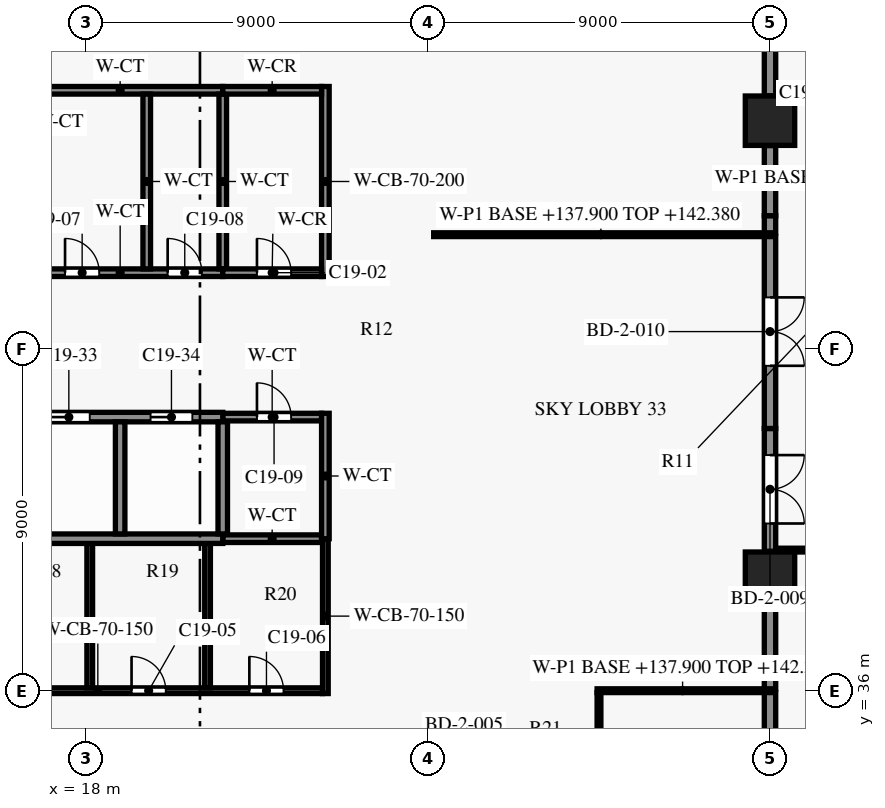
"""IFC4 building model, lengths in metres.
Left out: names, types, materials, properties, quantities, classifications, styles, units other than length and angle.
Written with IfcOpenShell. Run it as: python <this file> out.ifc"""

import sys

from ifc_helpers import new_model, si_unit, direction, frame, frame_2d, origin, origin_2d, place, context, subcontext, project, spatial, rectangle, extrude, element, fill, save


model = new_model("IFC4")
c1 = context("Model", 3, precision=1e-05, world=origin(), true_north=direction((0.0, 1.0)))
c2 = subcontext(c1, "Body", "Model", "MODEL_VIEW")
j1 = project(units=[si_unit("LENGTHUNIT", "METRE"), si_unit("PLANEANGLEUNIT", "RADIAN")], contexts=[c1])
p1 = place(None, origin())
s1 = spatial("IfcSite", under=j1, at=p1, CompositionType="ELEMENT")
p2 = place(p1, origin())
s2 = spatial("IfcBuilding", under=s1, at=p2, CompositionType="ELEMENT")
p3 = place(p2, frame((0.0, 0.0, 137.9)))
s3 = spatial("IfcBuildingStorey", under=s2, at=p3, CompositionType="ELEMENT", Elevation=137.9)
for number, where, z_axis, x_axis in (
    (1, (36.0, 39.0, 0.0), (0.0, 0.0, 1.0), (1.0, 0.0, 0.0)),
    (2, (36.0, 51.0, 0.0), (0.0, 0.0, 1.0), (1.0, 0.0, 0.0)),
):
    element("IfcColumn", number, at=place(p3, frame(where, z_axis=z_axis, x_axis=x_axis)), inside=s3, PredefinedType="COLUMN", context=c2, shape_type="SweptSolid", body=[
        extrude(rectangle(XDim=1.3, YDim=1.3, at=origin_2d()), origin(), (0.0, 0.0, 1.0), 5.5),
    ])
p4 = place(p3, frame((12.4, 36.0, 0.0), z_axis=(0.0, 0.0, 1.0), x_axis=(1.0, 0.0, 0.0)))
e3 = element("IfcWall", 3, at=p4, inside=s3, PredefinedType="SHEAR", context=c2, shape_type="SweptSolid", body=[
    extrude(rectangle(XDim=11.825, YDim=0.15, at=frame_2d((5.913, 0.0))), origin(), (0.0, 0.0, 1.0), 5.2),
])
p5 = place(p4, frame((0.825, 0.0, 0.0)))
e4 = element("IfcOpeningElement", 4, at=p5, cuts=e3, PredefinedType="OPENING", context=c2, shape_type="SweptSolid", body=[
    extrude(rectangle(XDim=0.95, YDim=2.1, at=frame_2d((0.475, 1.05))), frame((0.0, 0.085, 0.0), z_axis=(0.0, -1.0, 0.0), x_axis=(1.0, 0.0, 0.0)), (0.0, 0.0, 1.0), 0.17),
])
p6 = place(p4, frame((3.65, 0.0, 0.0)))
e5 = element("IfcOpeningElement", 5, at=p6, cuts=e3, PredefinedType="OPENING", context=c2, shape_type="SweptSolid", body=[
    extrude(rectangle(XDim=1.0, YDim=2.1, at=frame_2d((0.5, 1.05))), frame((0.0, 0.085, 0.0), z_axis=(0.0, -1.0, 0.0), x_axis=(1.0, 0.0, 0.0)), (0.0, 0.0, 1.0), 0.17),
])
p7 = place(p4, frame((6.8, 0.0, 0.0)))
e6 = element("IfcOpeningElement", 6, at=p7, cuts=e3, PredefinedType="OPENING", context=c2, shape_type="SweptSolid", body=[
    extrude(rectangle(XDim=0.9, YDim=2.1, at=frame_2d((0.45, 1.05))), frame((0.0, 0.085, 0.0), z_axis=(0.0, -1.0, 0.0), x_axis=(1.0, 0.0, 0.0)), (0.0, 0.0, 1.0), 0.17),
])
p8 = place(p4, frame((9.9, 0.0, 0.0)))
e7 = element("IfcOpeningElement", 7, at=p8, cuts=e3, PredefinedType="OPENING", context=c2, shape_type="SweptSolid", body=[
    extrude(rectangle(XDim=0.9, YDim=2.1, at=frame_2d((0.45, 1.05))), frame((0.0, 0.085, 0.0), z_axis=(0.0, -1.0, 0.0), x_axis=(1.0, 0.0, 0.0)), (0.0, 0.0, 1.0), 0.17),
])
p9 = place(p3, frame((21.6, 40.0, 0.0), z_axis=(0.0, 0.0, 1.0), x_axis=(1.0, 0.0, 0.0)))
e8 = element("IfcWall", 8, at=p9, inside=s3, PredefinedType="PARTITIONING", context=c2, shape_type="SweptSolid", body=[
    extrude(rectangle(XDim=2.6, YDim=0.2, at=frame_2d((1.3, 0.0))), origin(), (0.0, 0.0, 1.0), 5.2),
])
p10 = place(p3, frame((0.125, 40.0, 0.0), z_axis=(0.0, 0.0, 1.0), x_axis=(1.0, 0.0, 0.0)))
e9 = element("IfcWall", 9, at=p10, inside=s3, PredefinedType="SHEAR", context=c2, shape_type="SweptSolid", body=[
    extrude(rectangle(XDim=21.475, YDim=0.25, at=frame_2d((10.738, 0.0))), origin(), (0.0, 0.0, 1.0), 5.2),
])
p11 = place(p3, frame((21.6, 43.2, 0.0), z_axis=(0.0, 0.0, 1.0), x_axis=(1.0, 0.0, 0.0)))
e10 = element("IfcWall", 10, at=p11, inside=s3, PredefinedType="PARTITIONING", context=c2, shape_type="SweptSolid", body=[
    extrude(rectangle(XDim=2.6, YDim=0.2, at=frame_2d((1.3, 0.0))), origin(), (0.0, 0.0, 1.0), 5.2),
])
p12 = place(p11, frame((0.9, 0.0, 0.0)))
e11 = element("IfcOpeningElement", 11, at=p12, cuts=e10, PredefinedType="OPENING", context=c2, shape_type="SweptSolid", body=[
    extrude(rectangle(XDim=0.9, YDim=2.1, at=frame_2d((0.45, 1.05))), frame((0.0, 0.11, 0.0), z_axis=(0.0, -1.0, 0.0), x_axis=(1.0, 0.0, 0.0)), (0.0, 0.0, 1.0), 0.22),
])
p13 = place(p3, frame((0.125, 43.2, 0.0), z_axis=(0.0, 0.0, 1.0), x_axis=(1.0, 0.0, 0.0)))
e12 = element("IfcWall", 12, at=p13, inside=s3, PredefinedType="SHEAR", context=c2, shape_type="SweptSolid", body=[
    extrude(rectangle(XDim=21.475, YDim=0.25, at=frame_2d((10.738, 0.0))), origin(), (0.0, 0.0, 1.0), 5.2),
])
p14 = place(p13, frame((0.675, 0.0, 0.0)))
e13 = element("IfcOpeningElement", 13, at=p14, cuts=e12, PredefinedType="OPENING", context=c2, shape_type="SweptSolid", body=[
    extrude(rectangle(XDim=1.1, YDim=2.1, at=frame_2d((0.55, 1.05))), frame((0.0, 0.135, 0.0), z_axis=(0.0, -1.0, 0.0), x_axis=(1.0, 0.0, 0.0)), (0.0, 0.0, 1.0), 0.27),
])
p15 = place(p13, frame((3.375, 0.0, 0.0)))
e14 = element("IfcOpeningElement", 14, at=p15, cuts=e12, PredefinedType="OPENING", context=c2, shape_type="SweptSolid", body=[
    extrude(rectangle(XDim=1.1, YDim=2.1, at=frame_2d((0.55, 1.05))), frame((0.0, 0.135, 0.0), z_axis=(0.0, -1.0, 0.0), x_axis=(1.0, 0.0, 0.0)), (0.0, 0.0, 1.0), 0.27),
])
p16 = place(p13, frame((6.075, 0.0, 0.0)))
e15 = element("IfcOpeningElement", 15, at=p16, cuts=e12, PredefinedType="OPENING", context=c2, shape_type="SweptSolid", body=[
    extrude(rectangle(XDim=1.1, YDim=2.1, at=frame_2d((0.55, 1.05))), frame((0.0, 0.135, 0.0), z_axis=(0.0, -1.0, 0.0), x_axis=(1.0, 0.0, 0.0)), (0.0, 0.0, 1.0), 0.27),
])
p17 = place(p13, frame((8.775, 0.0, 0.0)))
e16 = element("IfcOpeningElement", 16, at=p17, cuts=e12, PredefinedType="OPENING", context=c2, shape_type="SweptSolid", body=[
    extrude(rectangle(XDim=1.1, YDim=2.1, at=frame_2d((0.55, 1.05))), frame((0.0, 0.135, 0.0), z_axis=(0.0, -1.0, 0.0), x_axis=(1.0, 0.0, 0.0)), (0.0, 0.0, 1.0), 0.27),
])
p18 = place(p13, frame((11.475, 0.0, 0.0)))
e17 = element("IfcOpeningElement", 17, at=p18, cuts=e12, PredefinedType="OPENING", context=c2, shape_type="SweptSolid", body=[
    extrude(rectangle(XDim=1.1, YDim=2.1, at=frame_2d((0.55, 1.05))), frame((0.0, 0.135, 0.0), z_axis=(0.0, -1.0, 0.0), x_axis=(1.0, 0.0, 0.0)), (0.0, 0.0, 1.0), 0.27),
])
p19 = place(p13, frame((14.175, 0.0, 0.0)))
e18 = element("IfcOpeningElement", 18, at=p19, cuts=e12, PredefinedType="OPENING", context=c2, shape_type="SweptSolid", body=[
    extrude(rectangle(XDim=1.1, YDim=2.1, at=frame_2d((0.55, 1.05))), frame((0.0, 0.135, 0.0), z_axis=(0.0, -1.0, 0.0), x_axis=(1.0, 0.0, 0.0)), (0.0, 0.0, 1.0), 0.27),
])
p20 = place(p13, frame((16.875, 0.0, 0.0)))
e19 = element("IfcOpeningElement", 19, at=p20, cuts=e12, PredefinedType="OPENING", context=c2, shape_type="SweptSolid", body=[
    extrude(rectangle(XDim=1.1, YDim=2.1, at=frame_2d((0.55, 1.05))), frame((0.0, 0.135, 0.0), z_axis=(0.0, -1.0, 0.0), x_axis=(1.0, 0.0, 0.0)), (0.0, 0.0, 1.0), 0.27),
])
p21 = place(p13, frame((19.575, 0.0, 0.0)))
e20 = element("IfcOpeningElement", 20, at=p21, cuts=e12, PredefinedType="OPENING", context=c2, shape_type="SweptSolid", body=[
    extrude(rectangle(XDim=1.1, YDim=2.1, at=frame_2d((0.55, 1.05))), frame((0.0, 0.135, 0.0), z_axis=(0.0, -1.0, 0.0), x_axis=(1.0, 0.0, 0.0)), (0.0, 0.0, 1.0), 0.27),
])
p22 = place(p3, frame((16.2, 47.0, 0.0), z_axis=(0.0, 0.0, 1.0), x_axis=(1.0, 0.0, 0.0)))
e21 = element("IfcWall", 21, at=p22, inside=s3, PredefinedType="PARTITIONING", context=c2, shape_type="SweptSolid", body=[
    extrude(rectangle(XDim=5.4, YDim=0.2, at=frame_2d((2.7, 0.0))), origin(), (0.0, 0.0, 1.0), 5.2),
])
p23 = place(p22, frame((1.25, 0.0, 0.0)))
e22 = element("IfcOpeningElement", 22, at=p23, cuts=e21, PredefinedType="OPENING", context=c2, shape_type="SweptSolid", body=[
    extrude(rectangle(XDim=0.9, YDim=2.1, at=frame_2d((0.45, 1.05))), frame((0.0, 0.11, 0.0), z_axis=(0.0, -1.0, 0.0), x_axis=(1.0, 0.0, 0.0)), (0.0, 0.0, 1.0), 0.22),
])
p24 = place(p22, frame((3.95, 0.0, 0.0)))
e23 = element("IfcOpeningElement", 23, at=p24, cuts=e21, PredefinedType="OPENING", context=c2, shape_type="SweptSolid", body=[
    extrude(rectangle(XDim=0.9, YDim=2.1, at=frame_2d((0.45, 1.05))), frame((0.0, 0.11, 0.0), z_axis=(0.0, -1.0, 0.0), x_axis=(1.0, 0.0, 0.0)), (0.0, 0.0, 1.0), 0.22),
])
p25 = place(p3, frame((21.6, 47.0, 0.0), z_axis=(0.0, 0.0, 1.0), x_axis=(1.0, 0.0, 0.0)))
e24 = element("IfcWall", 24, at=p25, inside=s3, PredefinedType="PARTITIONING", context=c2, shape_type="SweptSolid", body=[
    extrude(rectangle(XDim=2.6, YDim=0.2, at=frame_2d((1.3, 0.0))), origin(), (0.0, 0.0, 1.0), 5.2),
])
p26 = place(p25, frame((0.9, 0.0, 0.0)))
e25 = element("IfcOpeningElement", 25, at=p26, cuts=e24, PredefinedType="OPENING", context=c2, shape_type="SweptSolid", body=[
    extrude(rectangle(XDim=0.9, YDim=2.1, at=frame_2d((0.45, 1.05))), frame((0.0, 0.11, 0.0), z_axis=(0.0, -1.0, 0.0), x_axis=(1.0, 0.0, 0.0)), (0.0, 0.0, 1.0), 0.22),
])
p27 = place(p3, frame((16.2, 51.8, 0.0), z_axis=(0.0, 0.0, 1.0), x_axis=(1.0, 0.0, 0.0)))
e26 = element("IfcWall", 26, at=p27, inside=s3, PredefinedType="PARTITIONING", context=c2, shape_type="SweptSolid", body=[
    extrude(rectangle(XDim=5.4, YDim=0.2, at=frame_2d((2.7, 0.0))), origin(), (0.0, 0.0, 1.0), 5.2),
])
p28 = place(p3, frame((21.6, 51.8, 0.0), z_axis=(0.0, 0.0, 1.0), x_axis=(1.0, 0.0, 0.0)))
e27 = element("IfcWall", 27, at=p28, inside=s3, PredefinedType="PARTITIONING", context=c2, shape_type="SweptSolid", body=[
    extrude(rectangle(XDim=2.6, YDim=0.2, at=frame_2d((1.3, 0.0))), origin(), (0.0, 0.0, 1.0), 5.2),
])
p29 = place(p3, frame((18.1, 36.075, 0.0), z_axis=(0.0, 0.0, 1.0), x_axis=(0.0, 1.0, 0.0)))
e28 = element("IfcWall", 28, at=p29, inside=s3, PredefinedType="PARTITIONING", context=c2, shape_type="SweptSolid", body=[
    extrude(rectangle(XDim=3.8, YDim=0.15, at=frame_2d((1.9, 0.0))), origin(), (0.0, 0.0, 1.0), 5.2),
])
p30 = place(p3, frame((18.9, 40.125, 0.0), z_axis=(0.0, 0.0, 1.0), x_axis=(0.0, 1.0, 0.0)))
e29 = element("IfcWall", 29, at=p30, inside=s3, PredefinedType="SHEAR", context=c2, shape_type="SweptSolid", body=[
    extrude(rectangle(XDim=2.95, YDim=0.25, at=frame_2d((1.475, 0.0))), origin(), (0.0, 0.0, 1.0), 5.2),
])
p31 = place(p3, frame((19.6, 47.1, 0.0), z_axis=(0.0, 0.0, 1.0), x_axis=(0.0, 1.0, 0.0)))
e30 = element("IfcWall", 30, at=p31, inside=s3, PredefinedType="PARTITIONING", context=c2, shape_type="SweptSolid", body=[
    extrude(rectangle(XDim=4.6, YDim=0.2, at=frame_2d((2.3, 0.0))), origin(), (0.0, 0.0, 1.0), 5.2),
])
p32 = place(p3, frame((21.2, 36.075, 0.0), z_axis=(0.0, 0.0, 1.0), x_axis=(0.0, 1.0, 0.0)))
e31 = element("IfcWall", 31, at=p32, inside=s3, PredefinedType="PARTITIONING", context=c2, shape_type="SweptSolid", body=[
    extrude(rectangle(XDim=3.8, YDim=0.15, at=frame_2d((1.9, 0.0))), origin(), (0.0, 0.0, 1.0), 5.2),
])
p33 = place(p3, frame((21.6, 47.1, 0.0), z_axis=(0.0, 0.0, 1.0), x_axis=(0.0, 1.0, 0.0)))
e32 = element("IfcWall", 32, at=p33, inside=s3, PredefinedType="PARTITIONING", context=c2, shape_type="SweptSolid", body=[
    extrude(rectangle(XDim=4.6, YDim=0.2, at=frame_2d((2.3, 0.0))), origin(), (0.0, 0.0, 1.0), 5.2),
])
p34 = place(p3, frame((21.6, 40.125, 0.0), z_axis=(0.0, 0.0, 1.0), x_axis=(0.0, 1.0, 0.0)))
e33 = element("IfcWall", 33, at=p34, inside=s3, PredefinedType="SHEAR", context=c2, shape_type="SweptSolid", body=[
    extrude(rectangle(XDim=2.95, YDim=0.25, at=frame_2d((1.475, 0.0))), origin(), (0.0, 0.0, 1.0), 5.2),
])
p35 = place(p3, frame((24.3, 35.925, 0.0), z_axis=(0.0, 0.0, 1.0), x_axis=(0.0, 1.0, 0.0)))
e34 = element("IfcWall", 34, at=p35, inside=s3, PredefinedType="SHEAR", context=c2, shape_type="SweptSolid", body=[
    extrude(rectangle(XDim=4.075, YDim=0.15, at=frame_2d((2.038, 0.0))), origin(), (0.0, 0.0, 1.0), 5.2),
])
p36 = place(p3, frame((24.3, 40.0, 0.0), z_axis=(0.0, 0.0, 1.0), x_axis=(0.0, 1.0, 0.0)))
e35 = element("IfcWall", 35, at=p36, inside=s3, PredefinedType="PARTITIONING", context=c2, shape_type="SweptSolid", body=[
    extrude(rectangle(XDim=3.3, YDim=0.2, at=frame_2d((1.65, 0.0))), origin(), (0.0, 0.0, 1.0), 5.2),
])
p37 = place(p3, frame((24.3, 46.9, 0.0), z_axis=(0.0, 0.0, 1.0), x_axis=(0.0, 1.0, 0.0)))
e36 = element("IfcWall", 36, at=p37, inside=s3, PredefinedType="SHEAR", context=c2, shape_type="SweptSolid", body=[
    extrude(rectangle(XDim=5.0, YDim=0.2, at=frame_2d((2.5, 0.0))), origin(), (0.0, 0.0, 1.0), 5.2),
])
p38 = place(p3, frame((31.5, 35.95, 0.0), z_axis=(0.0, 0.0, 1.0), x_axis=(0.0, -1.0, 0.0)))
e37 = element("IfcWall", 37, at=p38, inside=s3, PredefinedType="PARTITIONING", context=c2, shape_type="SweptSolid", body=[
    extrude(rectangle(XDim=2.4, YDim=0.1, at=frame_2d((1.2, 0.0))), origin(), (0.0, 0.0, 1.0), 5.18),
])
p39 = place(p3, frame((36.0, 35.95, 0.0), z_axis=(0.0, 0.0, 1.0), x_axis=(0.0, -1.0, 0.0)))
e38 = element("IfcWall", 38, at=p39, inside=s3, PredefinedType="PARTITIONING", context=c2, shape_type="SweptSolid", body=[
    extrude(rectangle(XDim=5.9, YDim=0.3, at=frame_2d((2.95, 0.0))), origin(), (0.0, 0.0, 1.0), 4.48),
])
p40 = place(p3, frame((35.95, 36.0, 0.0), z_axis=(0.0, 0.0, 1.0), x_axis=(-1.0, 0.0, 0.0)))
e39 = element("IfcWall", 39, at=p40, inside=s3, PredefinedType="PARTITIONING", context=c2, shape_type="SweptSolid", body=[
    extrude(rectangle(XDim=4.5, YDim=0.1, at=frame_2d((2.25, 0.0))), origin(), (0.0, 0.0, 1.0), 4.48),
])
p41 = place(p3, frame((36.0, 38.345, 0.0), z_axis=(0.0, 0.0, 1.0), x_axis=(0.0, -1.0, 0.0)))
e40 = element("IfcWall", 40, at=p41, inside=s3, PredefinedType="PARTITIONING", context=c2, shape_type="SweptSolid", body=[
    extrude(rectangle(XDim=2.295, YDim=0.3, at=frame_2d((1.147, 0.0))), origin(), (0.0, 0.0, 1.0), 4.48),
])
p42 = place(p3, frame((66.05, 39.7, 0.0), z_axis=(0.0, 0.0, 1.0), x_axis=(-1.0, 0.0, 0.0)))
e41 = element("IfcWall", 41, at=p42, inside=s3, PredefinedType="PARTITIONING", context=c2, shape_type="SweptSolid", body=[
    extrude(rectangle(XDim=30.0, YDim=0.1, at=frame_2d((15.0, 0.0))), origin(), (0.0, 0.0, 1.0), 4.48),
])
p43 = place(p3, frame((36.0, 42.9, 0.0), z_axis=(0.0, 0.0, 1.0), x_axis=(0.0, -1.0, 0.0)))
e42 = element("IfcWall", 42, at=p43, inside=s3, PredefinedType="PARTITIONING", context=c2, shape_type="SweptSolid", body=[
    extrude(rectangle(XDim=3.23, YDim=0.3, at=frame_2d((1.615, 0.0))), origin(), (0.0, 0.0, 1.0), 4.48),
])
p44 = place(p43, frame((0.7, 0.0, 0.0)))
e43 = element("IfcOpeningElement", 43, at=p44, cuts=e42, PredefinedType="OPENING", context=c2, shape_type="SweptSolid", body=[
    extrude(rectangle(XDim=1.8, YDim=2.1, at=frame_2d((0.9, 1.05))), frame((0.0, 0.16, 0.0), z_axis=(0.0, -1.0, 0.0), x_axis=(1.0, 0.0, 0.0)), (0.0, 0.0, 1.0), 0.32),
])
p45 = place(p3, frame((36.0, 47.95, 0.0), z_axis=(0.0, 0.0, 1.0), x_axis=(0.0, -1.0, 0.0)))
e44 = element("IfcWall", 44, at=p45, inside=s3, PredefinedType="PARTITIONING", context=c2, shape_type="SweptSolid", body=[
    extrude(rectangle(XDim=5.05, YDim=0.3, at=frame_2d((2.525, 0.0))), origin(), (0.0, 0.0, 1.0), 4.48),
])
p46 = place(p45, frame((1.6, 0.0, 0.0)))
e45 = element("IfcOpeningElement", 45, at=p46, cuts=e44, PredefinedType="OPENING", context=c2, shape_type="SweptSolid", body=[
    extrude(rectangle(XDim=1.8, YDim=2.1, at=frame_2d((0.9, 1.05))), frame((0.0, 0.16, 0.0), z_axis=(0.0, -1.0, 0.0), x_axis=(1.0, 0.0, 0.0)), (0.0, 0.0, 1.0), 0.32),
])
p47 = place(p3, frame((27.15, 48.0, 0.0), z_axis=(0.0, 0.0, 1.0), x_axis=(1.0, 0.0, 0.0)))
e46 = element("IfcWall", 46, at=p47, inside=s3, PredefinedType="PARTITIONING", context=c2, shape_type="SweptSolid", body=[
    extrude(rectangle(XDim=8.8, YDim=0.1, at=frame_2d((4.4, 0.0))), origin(), (0.0, 0.0, 1.0), 4.48),
])
p48 = place(p3, frame((36.0, 48.05, 0.0), z_axis=(0.0, 0.0, 1.0), x_axis=(0.0, 1.0, 0.0)))
e47 = element("IfcWall", 47, at=p48, inside=s3, PredefinedType="PARTITIONING", context=c2, shape_type="SweptSolid", body=[
    extrude(rectangle(XDim=0.45, YDim=0.3, at=frame_2d((0.225, 0.0))), origin(), (0.0, 0.0, 1.0), 4.48),
])
p49 = place(p3, frame((36.0, 48.5, 0.0), z_axis=(0.0, 0.0, 1.0), x_axis=(0.0, 1.0, 0.0)))
e48 = element("IfcWall", 48, at=p49, inside=s3, PredefinedType="PARTITIONING", context=c2, shape_type="SweptSolid", body=[
    extrude(rectangle(XDim=1.845, YDim=0.3, at=frame_2d((0.922, 0.0))), origin(), (0.0, 0.0, 1.0), 4.48),
])
p50 = place(p3, frame((36.0, 51.655, 0.0), z_axis=(0.0, 0.0, 1.0), x_axis=(0.0, 1.0, 0.0)))
e49 = element("IfcWall", 49, at=p50, inside=s3, PredefinedType="PARTITIONING", context=c2, shape_type="SweptSolid", body=[
    extrude(rectangle(XDim=2.045, YDim=0.3, at=frame_2d((1.022, 0.0))), origin(), (0.0, 0.0, 1.0), 4.48),
])
p51 = place(p26, origin())
e50 = element("IfcDoor", 50, at=p51, inside=s3, OperationType="SINGLE_SWING_LEFT", PredefinedType="DOOR", context=c2, shape_type="SweptSolid", body=[
    extrude(rectangle(XDim=0.9, YDim=2.1, at=frame_2d((0.45, 1.05))), frame((0.0, 0.025, 0.0), z_axis=(0.0, -1.0, 0.0), x_axis=(1.0, 0.0, 0.0)), (0.0, 0.0, 1.0), 0.05),
])
fill(e25, e50)
p52 = place(p7, origin())
e51 = element("IfcDoor", 51, at=p52, inside=s3, OperationType="SINGLE_SWING_RIGHT", PredefinedType="DOOR", context=c2, shape_type="SweptSolid", body=[
    extrude(rectangle(XDim=0.9, YDim=2.1, at=frame_2d((0.45, 1.05))), frame((0.0, 0.025, 0.0), z_axis=(0.0, -1.0, 0.0), x_axis=(1.0, 0.0, 0.0)), (0.0, 0.0, 1.0), 0.05),
])
fill(e6, e51)
p53 = place(p8, origin())
e52 = element("IfcDoor", 52, at=p53, inside=s3, OperationType="SINGLE_SWING_LEFT", PredefinedType="DOOR", context=c2, shape_type="SweptSolid", body=[
    extrude(rectangle(XDim=0.9, YDim=2.1, at=frame_2d((0.45, 1.05))), frame((0.0, 0.025, 0.0), z_axis=(0.0, -1.0, 0.0), x_axis=(1.0, 0.0, 0.0)), (0.0, 0.0, 1.0), 0.05),
])
fill(e7, e52)
p54 = place(p23, origin())
e53 = element("IfcDoor", 53, at=p54, inside=s3, OperationType="SINGLE_SWING_LEFT", PredefinedType="DOOR", context=c2, shape_type="SweptSolid", body=[
    extrude(rectangle(XDim=0.9, YDim=2.1, at=frame_2d((0.45, 1.05))), frame((0.0, 0.025, 0.0), z_axis=(0.0, -1.0, 0.0), x_axis=(1.0, 0.0, 0.0)), (0.0, 0.0, 1.0), 0.05),
])
fill(e22, e53)
p55 = place(p24, origin())
e54 = element("IfcDoor", 54, at=p55, inside=s3, OperationType="SINGLE_SWING_RIGHT", PredefinedType="DOOR", context=c2, shape_type="SweptSolid", body=[
    extrude(rectangle(XDim=0.9, YDim=2.1, at=frame_2d((0.45, 1.05))), frame((0.0, 0.025, 0.0), z_axis=(0.0, -1.0, 0.0), x_axis=(1.0, 0.0, 0.0)), (0.0, 0.0, 1.0), 0.05),
])
fill(e23, e54)
p56 = place(p12, origin())
e55 = element("IfcDoor", 55, at=p56, inside=s3, OperationType="SINGLE_SWING_RIGHT", PredefinedType="DOOR", context=c2, shape_type="SweptSolid", body=[
    extrude(rectangle(XDim=0.9, YDim=2.1, at=frame_2d((0.45, 1.05))), frame((0.0, 0.025, 0.0), z_axis=(0.0, -1.0, 0.0), x_axis=(1.0, 0.0, 0.0)), (0.0, 0.0, 1.0), 0.05),
])
fill(e11, e55)
p57 = place(p20, origin())
e56 = element("IfcDoor", 56, at=p57, inside=s3, OperationType="DOUBLE_DOOR_SLIDING", PredefinedType="DOOR", context=c2, shape_type="SweptSolid", body=[
    extrude(rectangle(XDim=1.1, YDim=2.1, at=frame_2d((0.55, 1.05))), frame((0.0, 0.025, 0.0), z_axis=(0.0, -1.0, 0.0), x_axis=(1.0, 0.0, 0.0)), (0.0, 0.0, 1.0), 0.05),
])
fill(e19, e56)
p58 = place(p21, origin())
e57 = element("IfcDoor", 57, at=p58, inside=s3, OperationType="DOUBLE_DOOR_SLIDING", PredefinedType="DOOR", context=c2, shape_type="SweptSolid", body=[
    extrude(rectangle(XDim=1.1, YDim=2.1, at=frame_2d((0.55, 1.05))), frame((0.0, 0.025, 0.0), z_axis=(0.0, -1.0, 0.0), x_axis=(1.0, 0.0, 0.0)), (0.0, 0.0, 1.0), 0.05),
])
fill(e20, e57)
p59 = place(p44, origin())
e58 = element("IfcDoor", 58, at=p59, inside=s3, OperationType="DOUBLE_DOOR_SINGLE_SWING", PredefinedType="DOOR", context=c2, shape_type="SweptSolid", body=[
    extrude(rectangle(XDim=1.8, YDim=2.1, at=frame_2d((0.9, 1.05))), frame((0.0, 0.025, 0.0), z_axis=(0.0, -1.0, 0.0), x_axis=(1.0, 0.0, 0.0)), (0.0, 0.0, 1.0), 0.05),
])
fill(e43, e58)
p60 = place(p46, origin())
e59 = element("IfcDoor", 59, at=p60, inside=s3, OperationType="DOUBLE_DOOR_SINGLE_SWING", PredefinedType="DOOR", context=c2, shape_type="SweptSolid", body=[
    extrude(rectangle(XDim=1.8, YDim=2.1, at=frame_2d((0.9, 1.05))), frame((0.0, 0.025, 0.0), z_axis=(0.0, -1.0, 0.0), x_axis=(1.0, 0.0, 0.0)), (0.0, 0.0, 1.0), 0.05),
])
fill(e45, e59)
save(model, sys.argv[1])
